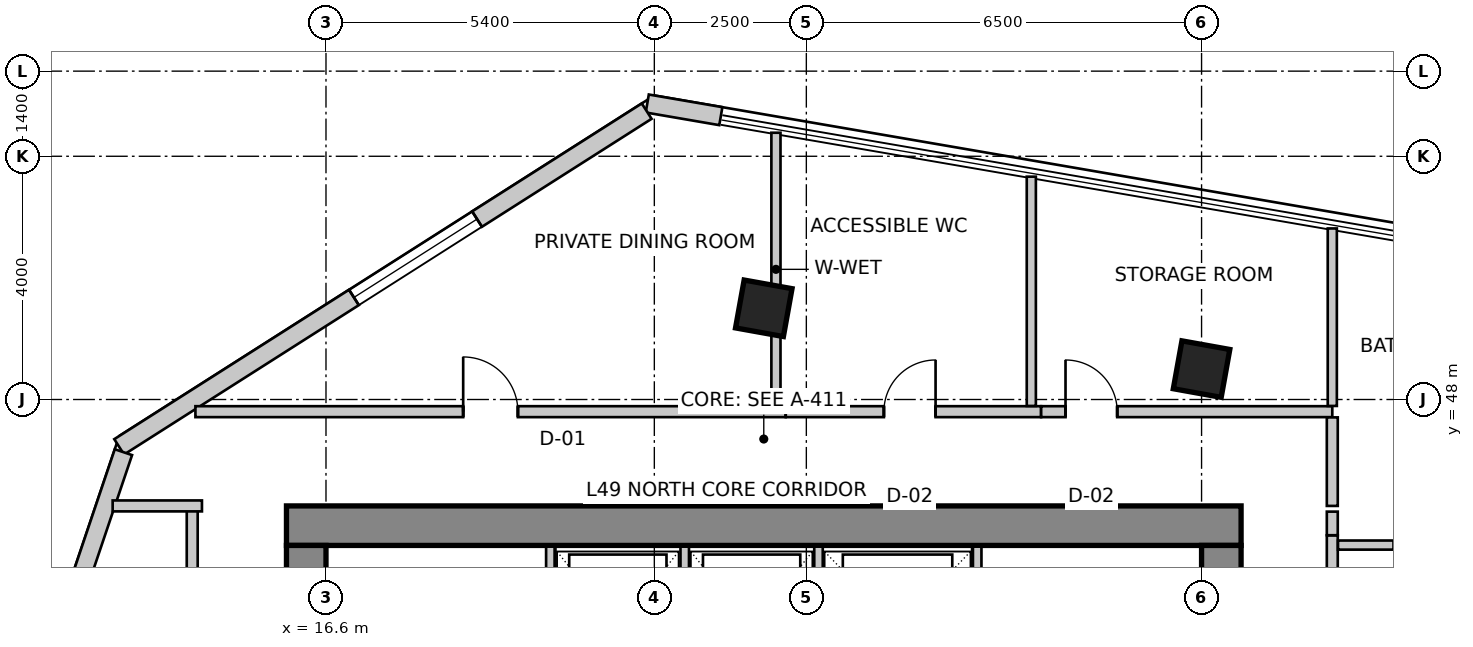
"""IFC4 building model, lengths in metres.
Left out: names, types, materials, properties, quantities, classifications, styles, units other than length and angle.
Written with IfcOpenShell. Run it as: python <this file> out.ifc"""

import sys

from ifc_helpers import new_model, si_unit, direction, frame, frame_2d, origin, origin_2d, place, context, subcontext, project, spatial, rectangle, extrude, source, transform, mapped, element, fill, save


model = new_model("IFC4")
c1 = context("Model", 3, precision=1e-05, world=origin(), true_north=direction((0.0, 1.0)))
c2 = subcontext(c1, "Body", "Model", "MODEL_VIEW")
j1 = project(units=[si_unit("LENGTHUNIT", "METRE"), si_unit("PLANEANGLEUNIT", "RADIAN")], contexts=[c1])
p1 = place(None, origin())
s1 = spatial("IfcSite", under=j1, at=p1, CompositionType="ELEMENT")
p2 = place(p1, origin())
s2 = spatial("IfcBuilding", under=s1, at=p2, CompositionType="ELEMENT")
p3 = place(p2, frame((0.0, 0.0, 197.4)))
s3 = spatial("IfcBuildingStorey", under=s2, at=p3, CompositionType="ELEMENT", Elevation=197.4)
p4 = place(p3, frame((15.95, 45.925, 0.0), z_axis=(0.0, 0.0, 1.0), x_axis=(1.0, 0.0, 0.0)))
e1 = element("IfcWall", 1, at=p4, inside=s3, PredefinedType="SHEAR", context=c2, shape_type="SweptSolid", body=[
    extrude(rectangle(XDim=15.7, YDim=0.65, at=frame_2d((7.85, 0.0))), origin(), (0.0, 0.0, 1.0), 3.5),
])
p5 = place(p3, frame((16.275, 34.2, 0.0), z_axis=(0.0, 0.0, 1.0), x_axis=(0.0, 1.0, 0.0)))
e2 = element("IfcWall", 2, at=p5, inside=s3, PredefinedType="SHEAR", context=c2, shape_type="SweptSolid", body=[
    extrude(rectangle(XDim=11.4, YDim=0.65, at=frame_2d((5.7, 0.0))), origin(), (0.0, 0.0, 1.0), 3.5),
])
m1 = source(origin(), c2, "Body", "SweptSolid", [
    extrude(rectangle(XDim=1.1, YDim=2.15, at=frame_2d((0.55, 1.075))), frame((0.0, 0.335, 0.0), z_axis=(0.0, -1.0, 0.0), x_axis=(1.0, 0.0, 0.0)), (0.0, 0.0, 1.0), 0.67),
])
p6 = place(p5, frame((7.15, 0.0, 0.0)))
e3 = element("IfcOpeningElement", 3, at=p6, cuts=e2, PredefinedType="OPENING", context=c2, shape_type="MappedRepresentation", body=[
    mapped(m1, transform((0.0, 0.0, 0.0), scale=1.0)),
])
p7 = place(p3, frame((31.325, 34.2, 0.0), z_axis=(0.0, 0.0, 1.0), x_axis=(0.0, 1.0, 0.0)))
e4 = element("IfcWall", 4, at=p7, inside=s3, PredefinedType="SHEAR", context=c2, shape_type="SweptSolid", body=[
    extrude(rectangle(XDim=11.4, YDim=0.65, at=frame_2d((5.7, 0.0))), origin(), (0.0, 0.0, 1.0), 3.5),
])
p8 = place(p7, frame((7.35, 0.0, 0.0)))
e5 = element("IfcOpeningElement", 5, at=p8, cuts=e4, PredefinedType="OPENING", context=c2, shape_type="MappedRepresentation", body=[
    mapped(m1, transform((0.0, 0.0, 0.0), scale=1.0)),
])
m2 = source(origin(), c2, "Body", "SweptSolid", [
    extrude(rectangle(XDim=0.8, YDim=0.8, at=origin_2d()), origin(), (0.0, 0.0, 1.0), 3.5),
])
for number, where, z_axis, x_axis in (
    (6, (23.8, 49.5, 0.0), (0.0, 0.0, 1.0), (0.984, -0.177, 0.0)),
    (7, (31.0, 48.5, 0.0), (0.0, 0.0, 1.0), (0.984, -0.177, 0.0)),
):
    element("IfcColumn", number, at=place(p3, frame(where, z_axis=z_axis, x_axis=x_axis)), inside=s3, PredefinedType="COLUMN", context=c2, shape_type="MappedRepresentation", body=[
        mapped(m2, transform((0.0, 0.0, 0.0), scale=1.0)),
    ])
p9 = place(p3, frame((23.094, 52.66, 0.0), z_axis=(0.0, 0.0, 1.0), x_axis=(-0.985503719785, 0.169653818966, 0.0)))
e8 = element("IfcWall", 8, at=p9, inside=s3, PredefinedType="SOLIDWALL", context=c2, shape_type="SweptSolid", body=[
    extrude(rectangle(XDim=1.228, YDim=0.3, at=frame_2d((0.614, 0.0))), origin(), (0.0, 0.0, 1.0), 3.25),
])
p10 = place(p3, frame((21.875, 52.742, 0.0), z_axis=(0.0, 0.0, 1.0), x_axis=(-0.843666375448, -0.536867811419, 0.0)))
e9 = element("IfcWall", 9, at=p10, inside=s3, PredefinedType="SOLIDWALL", context=c2, shape_type="SweptSolid", body=[
    extrude(rectangle(XDim=10.284, YDim=0.3, at=frame_2d((5.142, 0.0))), origin(), (0.0, 0.0, 1.0), 3.25),
])
m3 = source(origin(), c2, "Body", "SweptSolid", [
    extrude(rectangle(XDim=2.4, YDim=2.2, at=frame_2d((1.2, 1.1))), frame((0.0, 0.16, 0.0), z_axis=(0.0, -1.0, 0.0), x_axis=(1.0, 0.0, 0.0)), (0.0, 0.0, 1.0), 0.32),
])
p11 = place(p10, frame((3.307, 0.0, 0.85)))
e10 = element("IfcOpeningElement", 10, at=p11, cuts=e9, PredefinedType="OPENING", context=c2, shape_type="MappedRepresentation", body=[
    mapped(m3, transform((0.0, 0.0, 0.0), scale=1.0)),
])
p12 = place(p3, frame((13.269, 47.134, 0.0), z_axis=(0.0, 0.0, 1.0), x_axis=(-0.319920776449, -0.947444297464, 0.0)))
e11 = element("IfcWall", 11, at=p12, inside=s3, PredefinedType="SOLIDWALL", context=c2, shape_type="SweptSolid", body=[
    extrude(rectangle(XDim=16.133, YDim=0.3, at=frame_2d((8.067, 0.0))), origin(), (0.0, 0.0, 1.0), 3.25),
])
m4 = source(origin(), c2, "Body", "SweptSolid", [
    extrude(rectangle(XDim=2.1, YDim=2.0, at=frame_2d((1.05, 1.0))), frame((0.0, 0.16, 0.0), z_axis=(0.0, -1.0, 0.0), x_axis=(1.0, 0.0, 0.0)), (0.0, 0.0, 1.0), 0.32),
])
p13 = place(p12, frame((2.513, 0.0, 0.85)))
e12 = element("IfcOpeningElement", 12, at=p13, cuts=e11, PredefinedType="OPENING", context=c2, shape_type="MappedRepresentation", body=[
    mapped(m4, transform((0.0, 0.0, 0.0), scale=1.0)),
])
p14 = place(p12, frame((7.26, 0.0, 0.85)))
e13 = element("IfcOpeningElement", 13, at=p14, cuts=e11, PredefinedType="OPENING", context=c2, shape_type="MappedRepresentation", body=[
    mapped(m3, transform((0.0, 0.0, 0.0), scale=1.0)),
])
p15 = place(p12, frame((12.307, 0.0, 0.85)))
e14 = element("IfcOpeningElement", 14, at=p15, cuts=e11, PredefinedType="OPENING", context=c2, shape_type="MappedRepresentation", body=[
    mapped(m4, transform((0.0, 0.0, 0.0), scale=1.0)),
])
for number, where, z_axis, x_axis in (
    (15, (20.29, 43.28, 0.0), (0.0, 0.0, 1.0), (0.0, 1.0, 0.0)),
    (16, (27.31, 43.28, 0.0), (0.0, 0.0, 1.0), (0.0, 1.0, 0.0)),
):
    element("IfcWall", number, at=place(p3, frame(where, z_axis=z_axis, x_axis=x_axis)), inside=s3, PredefinedType="SOLIDWALL", context=c2, shape_type="SweptSolid", body=[
        extrude(rectangle(XDim=2.3, YDim=0.14, at=frame_2d((1.15, 0.0))), origin(), (0.0, 0.0, 1.0), 3.25),
    ])
for number, where, z_axis, x_axis in (
    (17, (22.5, 43.02, 0.0), (0.0, 0.0, 1.0), (0.0, 1.0, 0.0)),
    (18, (24.7, 43.02, 0.0), (0.0, 0.0, 1.0), (0.0, 1.0, 0.0)),
):
    element("IfcWall", number, at=place(p3, frame(where, z_axis=z_axis, x_axis=x_axis)), inside=s3, PredefinedType="SOLIDWALL", context=c2, shape_type="SweptSolid", body=[
        extrude(rectangle(XDim=2.56, YDim=0.14, at=frame_2d((1.28, 0.0))), origin(), (0.0, 0.0, 1.0), 3.25),
    ])
p16 = place(p3, frame((14.4, 33.644, 0.0), z_axis=(0.0, 0.0, 1.0), x_axis=(0.0, 1.0, 0.0)))
e19 = element("IfcWall", 19, at=p16, inside=s3, PredefinedType="PARTITIONING", context=c2, shape_type="SweptSolid", body=[
    extrude(rectangle(XDim=12.606, YDim=0.18, at=frame_2d((6.303, 0.0))), origin(), (0.0, 0.0, 1.0), 3.25),
])
m5 = source(origin(), c2, "Body", "SweptSolid", [
    extrude(rectangle(XDim=0.9, YDim=2.15, at=frame_2d((0.45, 1.075))), frame((0.0, 0.1, 0.0), z_axis=(0.0, -1.0, 0.0), x_axis=(1.0, 0.0, 0.0)), (0.0, 0.0, 1.0), 0.2),
])
p17 = place(p16, frame((4.399, 0.0, 0.0)))
e20 = element("IfcOpeningElement", 20, at=p17, cuts=e19, PredefinedType="OPENING", context=c2, shape_type="MappedRepresentation", body=[
    mapped(m5, transform((0.0, 0.0, 0.0), scale=1.0)),
])
p18 = place(p3, frame((14.56, 46.25, 0.0), z_axis=(0.0, 0.0, 1.0), x_axis=(-1.0, 0.0, 0.0)))
e21 = element("IfcWall", 21, at=p18, inside=s3, PredefinedType="PARTITIONING", context=c2, shape_type="SweptSolid", body=[
    extrude(rectangle(XDim=1.469, YDim=0.18, at=frame_2d((0.734, 0.0))), origin(), (0.0, 0.0, 1.0), 3.25),
])
p19 = place(p3, frame((14.453, 47.8, 0.0), z_axis=(0.0, 0.0, 1.0), x_axis=(1.0, 0.0, 0.0)))
e22 = element("IfcWall", 22, at=p19, inside=s3, PredefinedType="PARTITIONING", context=c2, shape_type="SweptSolid", body=[
    extrude(rectangle(XDim=9.707, YDim=0.18, at=frame_2d((4.854, 0.0))), origin(), (0.0, 0.0, 1.0), 2.919),
])
p20 = place(p19, frame((4.404, 0.0, 0.0)))
e23 = element("IfcOpeningElement", 23, at=p20, cuts=e22, PredefinedType="OPENING", context=c2, shape_type="MappedRepresentation", body=[
    mapped(m5, transform((0.0, 0.0, 0.0), scale=1.0)),
])
p21 = place(p3, frame((24.162, 47.8, 0.0), z_axis=(0.0, 0.0, 1.0), x_axis=(1.0, 0.0, 0.0)))
e24 = element("IfcWall", 24, at=p21, inside=s3, PredefinedType="PARTITIONING", context=c2, shape_type="SweptSolid", body=[
    extrude(rectangle(XDim=4.198, YDim=0.18, at=frame_2d((2.099, 0.0))), origin(), (0.0, 0.0, 1.0), 3.25),
])
m6 = source(origin(), c2, "Body", "SweptSolid", [
    extrude(rectangle(XDim=0.85, YDim=2.15, at=frame_2d((0.425, 1.075))), frame((0.0, 0.1, 0.0), z_axis=(0.0, -1.0, 0.0), x_axis=(1.0, 0.0, 0.0)), (0.0, 0.0, 1.0), 0.2),
])
p22 = place(p21, frame((1.613, 0.0, 0.0)))
e25 = element("IfcOpeningElement", 25, at=p22, cuts=e24, PredefinedType="OPENING", context=c2, shape_type="MappedRepresentation", body=[
    mapped(m6, transform((0.0, 0.0, 0.0), scale=1.0)),
])
p23 = place(p3, frame((28.362, 47.8, 0.0), z_axis=(0.0, 0.0, 1.0), x_axis=(1.0, 0.0, 0.0)))
e26 = element("IfcWall", 26, at=p23, inside=s3, PredefinedType="PARTITIONING", context=c2, shape_type="SweptSolid", body=[
    extrude(rectangle(XDim=4.788, YDim=0.18, at=frame_2d((2.394, 0.0))), origin(), (0.0, 0.0, 1.0), 2.779),
])
p24 = place(p23, frame((0.401, 0.0, 0.0)))
e27 = element("IfcOpeningElement", 27, at=p24, cuts=e26, PredefinedType="OPENING", context=c2, shape_type="MappedRepresentation", body=[
    mapped(m6, transform((0.0, 0.0, 0.0), scale=1.0)),
])
p25 = place(p3, frame((33.15, 47.706, 0.0), z_axis=(0.0, 0.0, 1.0), x_axis=(0.0, -1.0, 0.0)))
e28 = element("IfcWall", 28, at=p25, inside=s3, PredefinedType="PARTITIONING", context=c2, shape_type="SweptSolid", body=[
    extrude(rectangle(XDim=1.456, YDim=0.18, at=frame_2d((0.728, 0.0))), origin(), (0.0, 0.0, 1.0), 2.779),
])
p26 = place(p3, frame((33.15, 45.766, 0.0), z_axis=(0.0, 0.0, 1.0), x_axis=(0.0, -1.0, 0.0)))
e29 = element("IfcWall", 29, at=p26, inside=s3, PredefinedType="PARTITIONING", context=c2, shape_type="SweptSolid", body=[
    extrude(rectangle(XDim=5.526, YDim=0.18, at=frame_2d((2.763, 0.0))), origin(), (0.0, 0.0, 1.0), 2.779),
])
p27 = place(p3, frame((33.15, 46.156, 0.0), z_axis=(0.0, 0.0, 1.0), x_axis=(0.0, -1.0, 0.0)))
e30 = element("IfcWall", 30, at=p27, inside=s3, PredefinedType="PARTITIONING", context=c2, shape_type="SweptSolid", body=[
    extrude(rectangle(XDim=0.388, YDim=0.18, at=frame_2d((0.194, 0.0))), origin(), (0.0, 0.0, 1.0), 2.919),
])
p28 = place(p3, frame((24.0, 52.387, 0.0), z_axis=(0.0, 0.0, 1.0), x_axis=(0.0, -1.0, 0.0)))
e31 = element("IfcWall", 31, at=p28, inside=s3, PredefinedType="PARTITIONING", context=c2, shape_type="SweptSolid", body=[
    extrude(rectangle(XDim=4.493, YDim=0.15, at=frame_2d((2.247, 0.0))), origin(), (0.0, 0.0, 1.0), 2.542),
])
p29 = place(p3, frame((28.2, 51.665, 0.0), z_axis=(0.0, 0.0, 1.0), x_axis=(0.0, -1.0, 0.0)))
e32 = element("IfcWall", 32, at=p29, inside=s3, PredefinedType="PARTITIONING", context=c2, shape_type="SweptSolid", body=[
    extrude(rectangle(XDim=3.771, YDim=0.15, at=frame_2d((1.885, 0.0))), origin(), (0.0, 0.0, 1.0), 2.542),
])
p30 = place(p3, frame((33.15, 50.813, 0.0), z_axis=(0.0, 0.0, 1.0), x_axis=(0.0, -1.0, 0.0)))
e33 = element("IfcWall", 33, at=p30, inside=s3, PredefinedType="PARTITIONING", context=c2, shape_type="SweptSolid", body=[
    extrude(rectangle(XDim=2.919, YDim=0.15, at=frame_2d((1.459, 0.0))), origin(), (0.0, 0.0, 1.0), 2.542),
])
p31 = place(p3, frame((33.244, 45.606, 0.0), z_axis=(0.0, 0.0, 1.0), x_axis=(1.0, 0.0, 0.0)))
e34 = element("IfcWall", 34, at=p31, inside=s3, PredefinedType="PARTITIONING", context=c2, shape_type="SweptSolid", body=[
    extrude(rectangle(XDim=2.816, YDim=0.15, at=frame_2d((1.408, 0.0))), origin(), (0.0, 0.0, 1.0), 2.779),
])
m7 = source(origin(), c2, "Body", "SweptSolid", [
    extrude(rectangle(XDim=0.85, YDim=2.15, at=frame_2d((0.425, 1.075))), frame((0.0, 0.085, 0.0), z_axis=(0.0, -1.0, 0.0), x_axis=(1.0, 0.0, 0.0)), (0.0, 0.0, 1.0), 0.17),
])
p32 = place(p31, frame((0.919, 0.0, 0.0)))
e35 = element("IfcOpeningElement", 35, at=p32, cuts=e34, PredefinedType="OPENING", context=c2, shape_type="MappedRepresentation", body=[
    mapped(m7, transform((0.0, 0.0, 0.0), scale=1.0)),
])
m8 = source(origin(), c2, "Body", "SweptSolid", [
    extrude(rectangle(XDim=2.4, YDim=2.2, at=frame_2d((1.2, 1.1))), frame((0.0, -0.015, 0.0), z_axis=(0.0, -1.0, 0.0), x_axis=(1.0, 0.0, 0.0)), (0.0, 0.0, 1.0), 0.06),
])
p33 = place(p11, origin())
e36 = element("IfcWindow", 36, at=p33, inside=s3, PartitioningType="SINGLE_PANEL", PredefinedType="WINDOW", context=c2, shape_type="MappedRepresentation", body=[
    mapped(m8, transform((0.0, 0.0, 0.0), scale=1.0)),
])
fill(e10, e36)
m9 = source(origin(), c2, "Body", "SweptSolid", [
    extrude(rectangle(XDim=0.9, YDim=2.15, at=frame_2d((0.45, 1.075))), frame((0.0, 0.025, 0.0), z_axis=(0.0, -1.0, 0.0), x_axis=(1.0, 0.0, 0.0)), (0.0, 0.0, 1.0), 0.05),
])
p34 = place(p20, origin())
e37 = element("IfcDoor", 37, at=p34, inside=s3, OperationType="SINGLE_SWING_LEFT", PredefinedType="DOOR", context=c2, shape_type="MappedRepresentation", body=[
    mapped(m9, transform((0.0, 0.0, 0.0), scale=1.0)),
])
fill(e23, e37)
m10 = source(origin(), c2, "Body", "SweptSolid", [
    extrude(rectangle(XDim=0.85, YDim=2.15, at=frame_2d((0.425, 1.075))), frame((0.0, 0.025, 0.0), z_axis=(0.0, -1.0, 0.0), x_axis=(1.0, 0.0, 0.0)), (0.0, 0.0, 1.0), 0.05),
])
p35 = place(p22, origin())
e38 = element("IfcDoor", 38, at=p35, inside=s3, OperationType="SINGLE_SWING_RIGHT", PredefinedType="DOOR", context=c2, shape_type="MappedRepresentation", body=[
    mapped(m10, transform((0.0, 0.0, 0.0), scale=1.0)),
])
fill(e25, e38)
p36 = place(p24, origin())
e39 = element("IfcDoor", 39, at=p36, inside=s3, OperationType="SINGLE_SWING_LEFT", PredefinedType="DOOR", context=c2, shape_type="MappedRepresentation", body=[
    mapped(m10, transform((0.0, 0.0, 0.0), scale=1.0)),
])
fill(e27, e39)
save(model, sys.argv[1])
